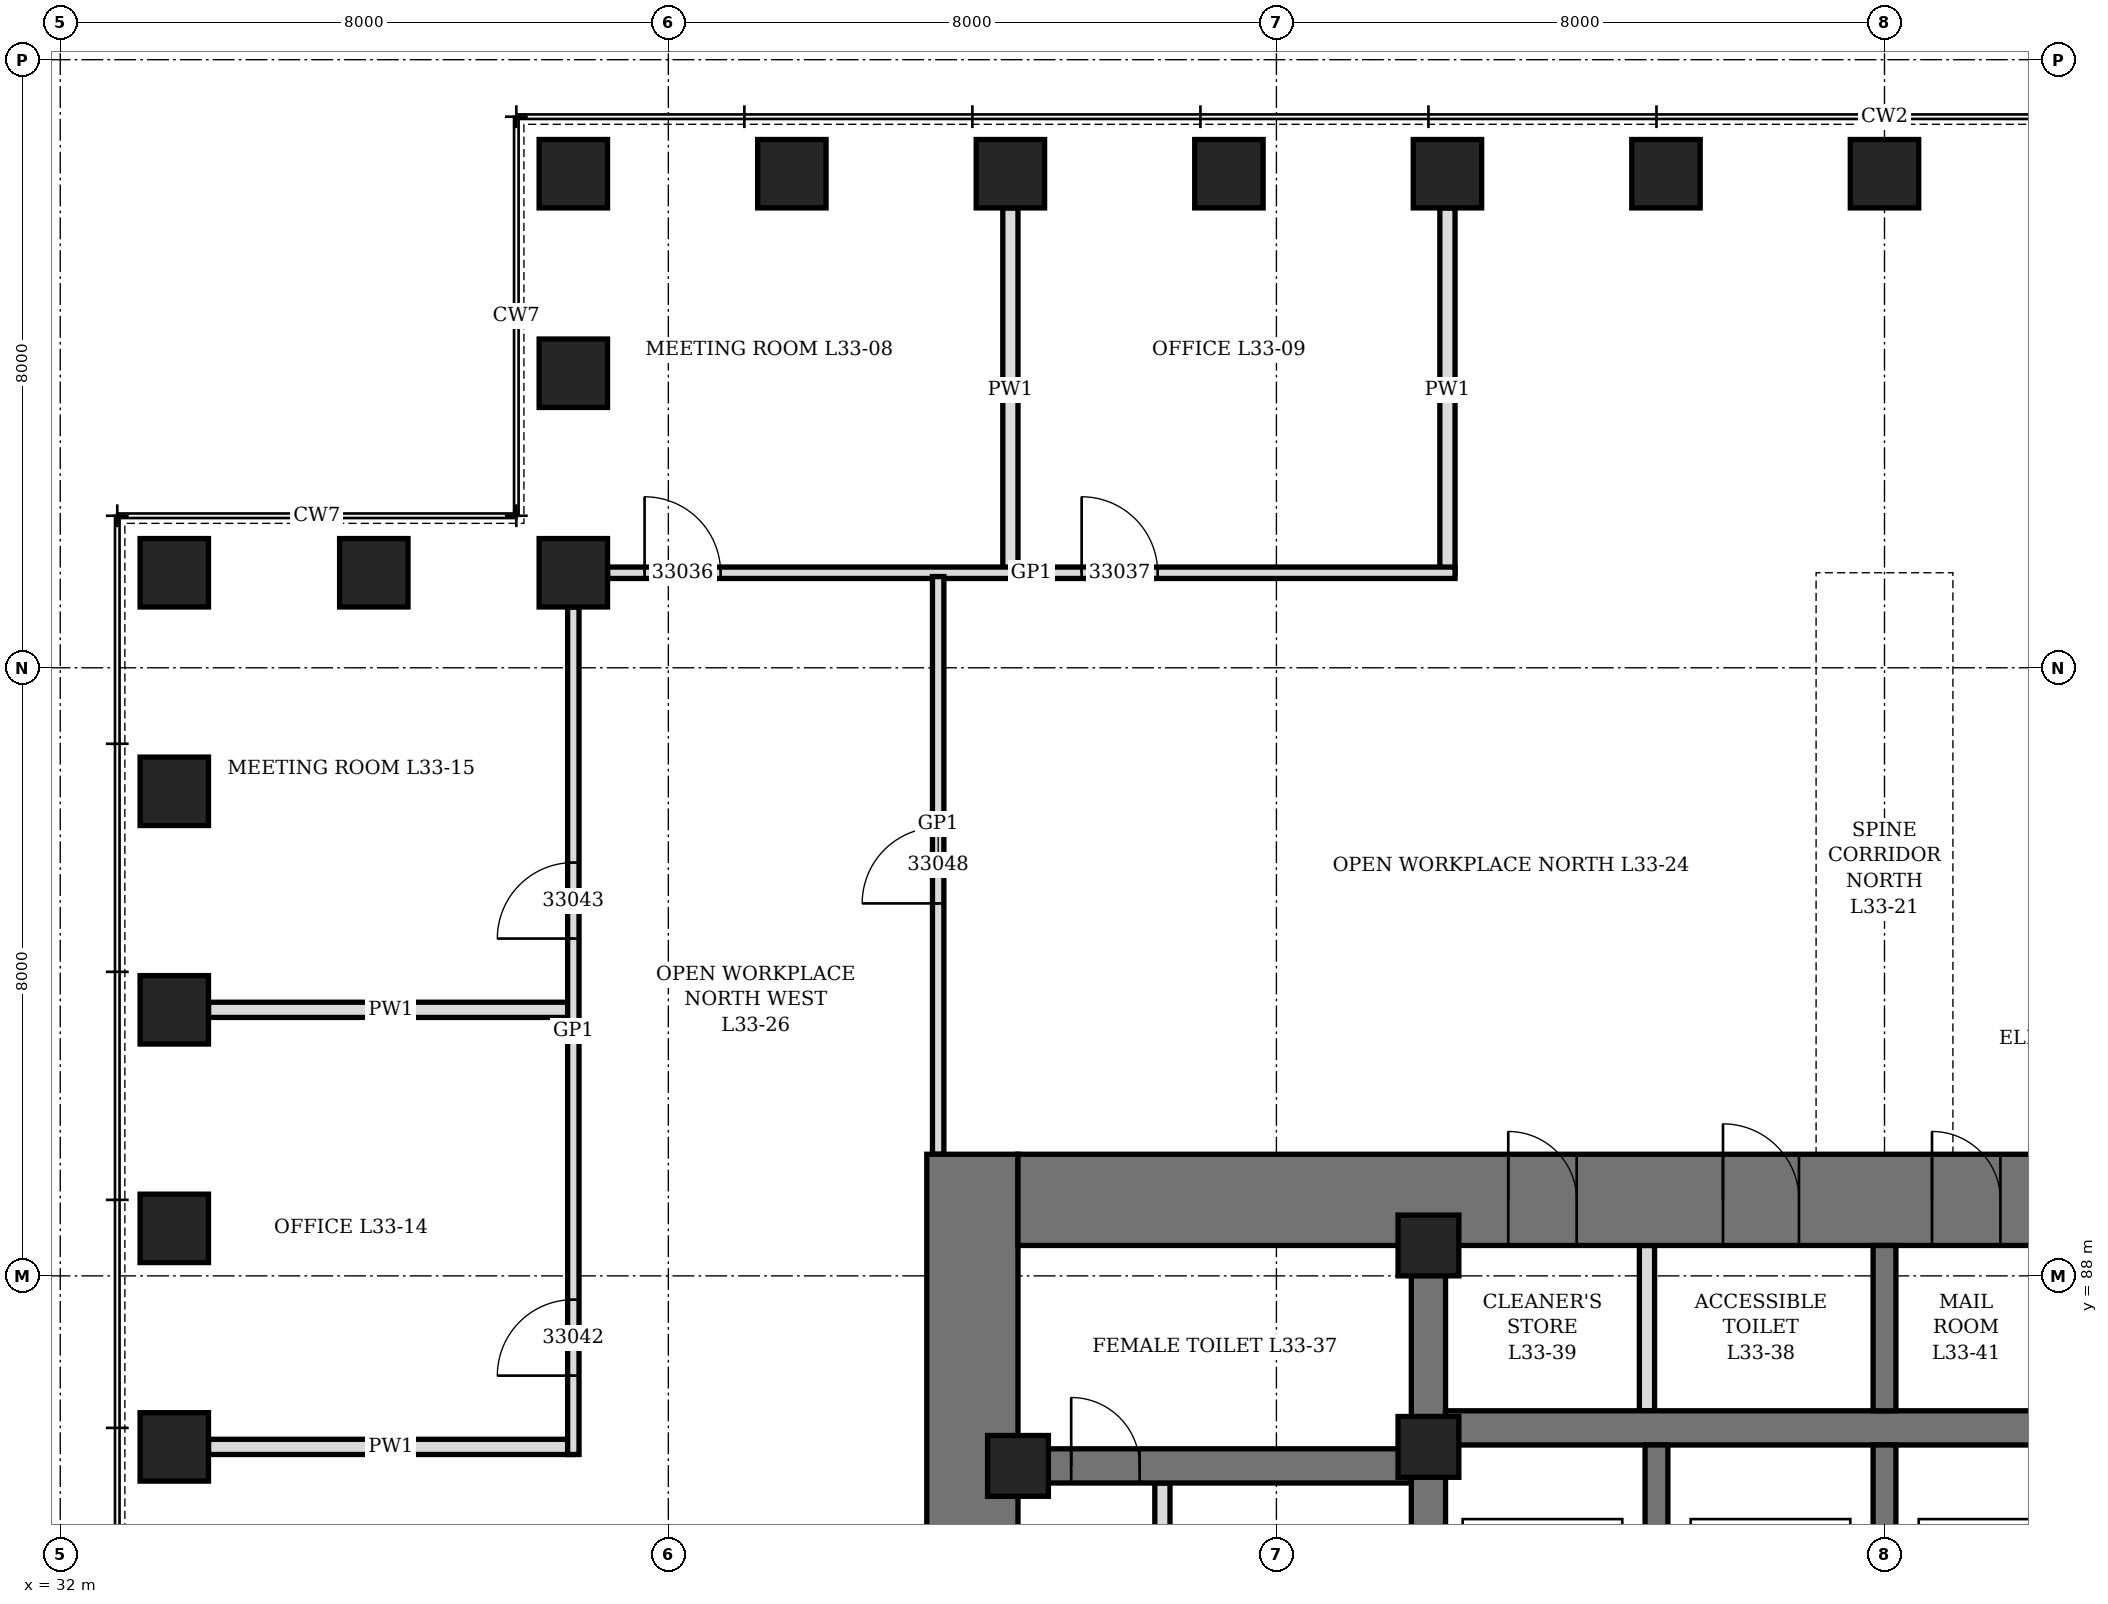
"""IFC4 building model, lengths in metres.
Left out: names, types, materials, properties, quantities, classifications, styles, units other than length and angle.
Written with IfcOpenShell. Run it as: python <this file> out.ifc"""

import sys

from ifc_helpers import new_model, si_unit, direction, frame, frame_2d, origin, origin_2d, place, context, subcontext, project, spatial, rectangle, hollow_rectangle, extrude, element, fill, save


model = new_model("IFC4")
c1 = context("Model", 3, precision=1e-05, world=origin(), true_north=direction((0.0, 1.0)))
c2 = subcontext(c1, "Body", "Model", "MODEL_VIEW")
j1 = project(units=[si_unit("LENGTHUNIT", "METRE"), si_unit("PLANEANGLEUNIT", "RADIAN")], contexts=[c1])
p1 = place(None, origin())
s1 = spatial("IfcSite", under=j1, at=p1, CompositionType="ELEMENT")
p2 = place(p1, origin())
s2 = spatial("IfcBuilding", under=s1, at=p2, CompositionType="ELEMENT")
p3 = place(p2, frame((0.0, 0.0, 150.1)))
s3 = spatial("IfcBuildingStorey", under=s2, at=p3, CompositionType="ELEMENT", Elevation=150.1)
for number, where, z_axis, x_axis in (
    (1, (56.0, 102.5, 0.0), (0.0, 0.0, 1.0), (1.0, 0.0, 0.0)),
    (2, (53.125, 102.5, 0.0), (0.0, 0.0, 1.0), (1.0, 0.0, 0.0)),
    (3, (50.25, 102.5, 0.0), (0.0, 0.0, 1.0), (1.0, 0.0, 0.0)),
    (4, (47.375, 102.5, 0.0), (0.0, 0.0, 1.0), (1.0, 0.0, 0.0)),
    (5, (44.5, 102.5, 0.0), (0.0, 0.0, 1.0), (1.0, 0.0, 0.0)),
    (6, (41.625, 102.5, 0.0), (0.0, 0.0, 1.0), (1.0, 0.0, 0.0)),
    (7, (38.75, 102.5, 0.0), (0.0, 0.0, 1.0), (0.0, 1.0, 0.0)),
    (8, (38.75, 99.875, 0.0), (0.0, 0.0, 1.0), (0.0, 1.0, 0.0)),
    (9, (38.75, 97.25, 0.0), (0.0, 0.0, 1.0), (1.0, 0.0, 0.0)),
    (10, (36.125, 97.25, 0.0), (0.0, 0.0, 1.0), (1.0, 0.0, 0.0)),
    (11, (33.5, 97.25, 0.0), (0.0, 0.0, 1.0), (0.0, 1.0, 0.0)),
    (12, (33.5, 94.375, 0.0), (0.0, 0.0, 1.0), (0.0, 1.0, 0.0)),
    (13, (33.5, 91.5, 0.0), (0.0, 0.0, 1.0), (0.0, 1.0, 0.0)),
    (14, (33.5, 88.625, 0.0), (0.0, 0.0, 1.0), (0.0, 1.0, 0.0)),
    (15, (33.5, 85.75, 0.0), (0.0, 0.0, 1.0), (0.0, 1.0, 0.0)),
):
    element("IfcColumn", number, at=place(p3, frame(where, z_axis=z_axis, x_axis=x_axis)), inside=s3, PredefinedType="COLUMN", context=c2, shape_type="SweptSolid", body=[
        extrude(hollow_rectangle(XDim=0.9, YDim=0.9, WallThickness=0.12, at=origin_2d()), origin(), (0.0, 0.0, 1.0), 4.2),
    ])
p4 = place(p3, frame((44.0, 70.4, 0.0), z_axis=(0.0, 0.0, 1.0), x_axis=(0.0, 1.0, 0.0)))
e16 = element("IfcWall", 16, at=p4, inside=s3, PredefinedType="SHEAR", context=c2, shape_type="SweptSolid", body=[
    extrude(rectangle(XDim=19.2, YDim=1.2, at=frame_2d((9.6, 0.0))), origin(), (0.0, 0.0, 1.0), 4.2),
])
p5 = place(p4, frame((8.6, 0.0, 0.0)))
e17 = element("IfcOpeningElement", 17, at=p5, cuts=e16, PredefinedType="OPENING", context=c2, shape_type="SweptSolid", body=[
    extrude(rectangle(XDim=2.0, YDim=2.4, at=frame_2d((1.0, 1.2))), frame((0.0, 0.61, 0.0), z_axis=(0.0, -1.0, 0.0), x_axis=(1.0, 0.0, 0.0)), (0.0, 0.0, 1.0), 1.22),
])
p6 = place(p3, frame((44.6, 89.0, 0.0), z_axis=(0.0, 0.0, 1.0), x_axis=(1.0, 0.0, 0.0)))
e18 = element("IfcWall", 18, at=p6, inside=s3, PredefinedType="SHEAR", context=c2, shape_type="SweptSolid", body=[
    extrude(rectangle(XDim=22.8, YDim=1.2, at=frame_2d((11.4, 0.0))), origin(), (0.0, 0.0, 1.0), 4.2),
])
p7 = place(p6, frame((9.275, 0.0, 0.0)))
e19 = element("IfcOpeningElement", 19, at=p7, cuts=e18, PredefinedType="OPENING", context=c2, shape_type="SweptSolid", body=[
    extrude(rectangle(XDim=1.0, YDim=2.1, at=frame_2d((0.5, 1.05))), frame((0.0, 0.61, 0.0), z_axis=(0.0, -1.0, 0.0), x_axis=(1.0, 0.0, 0.0)), (0.0, 0.0, 1.0), 1.22),
])
p8 = place(p6, frame((6.45, 0.0, 0.0)))
e20 = element("IfcOpeningElement", 20, at=p8, cuts=e18, PredefinedType="OPENING", context=c2, shape_type="SweptSolid", body=[
    extrude(rectangle(XDim=0.9, YDim=2.1, at=frame_2d((0.45, 1.05))), frame((0.0, 0.61, 0.0), z_axis=(0.0, -1.0, 0.0), x_axis=(1.0, 0.0, 0.0)), (0.0, 0.0, 1.0), 1.22),
])
p9 = place(p6, frame((12.025, 0.0, 0.0)))
e21 = element("IfcOpeningElement", 21, at=p9, cuts=e18, PredefinedType="OPENING", context=c2, shape_type="SweptSolid", body=[
    extrude(rectangle(XDim=0.9, YDim=2.1, at=frame_2d((0.45, 1.05))), frame((0.0, 0.61, 0.0), z_axis=(0.0, -1.0, 0.0), x_axis=(1.0, 0.0, 0.0)), (0.0, 0.0, 1.0), 1.22),
])
p10 = place(p6, frame((13.962, 0.0, 0.0)))
e22 = element("IfcOpeningElement", 22, at=p10, cuts=e18, PredefinedType="OPENING", context=c2, shape_type="SweptSolid", body=[
    extrude(rectangle(XDim=0.9, YDim=2.1, at=frame_2d((0.45, 1.05))), frame((0.0, 0.61, 0.0), z_axis=(0.0, -1.0, 0.0), x_axis=(1.0, 0.0, 0.0)), (0.0, 0.0, 1.0), 1.22),
])
p11 = place(p3, frame((50.0, 71.6, 0.0), z_axis=(0.0, 0.0, 1.0), x_axis=(0.0, 1.0, 0.0)))
e23 = element("IfcWall", 23, at=p11, inside=s3, PredefinedType="SHEAR", context=c2, shape_type="SweptSolid", body=[
    extrude(rectangle(XDim=16.8, YDim=0.45, at=frame_2d((8.4, 0.0))), origin(), (0.0, 0.0, 1.0), 4.2),
])
p12 = place(p11, frame((7.5, 0.0, 0.0)))
e24 = element("IfcOpeningElement", 24, at=p12, cuts=e23, PredefinedType="OPENING", context=c2, shape_type="SweptSolid", body=[
    extrude(rectangle(XDim=1.8, YDim=2.4, at=frame_2d((0.9, 1.2))), frame((0.0, 0.235, 0.0), z_axis=(0.0, -1.0, 0.0), x_axis=(1.0, 0.0, 0.0)), (0.0, 0.0, 1.0), 0.47),
])
p13 = place(p3, frame((44.6, 85.5, 0.0), z_axis=(0.0, 0.0, 1.0), x_axis=(1.0, 0.0, 0.0)))
e25 = element("IfcWall", 25, at=p13, inside=s3, PredefinedType="SHEAR", context=c2, shape_type="SweptSolid", body=[
    extrude(rectangle(XDim=5.175, YDim=0.45, at=frame_2d((2.587, 0.0))), origin(), (0.0, 0.0, 1.0), 4.2),
])
p14 = place(p13, frame((0.7, 0.0, 0.0)))
e26 = element("IfcOpeningElement", 26, at=p14, cuts=e25, PredefinedType="OPENING", context=c2, shape_type="SweptSolid", body=[
    extrude(rectangle(XDim=0.9, YDim=2.1, at=frame_2d((0.45, 1.05))), frame((0.0, 0.235, 0.0), z_axis=(0.0, -1.0, 0.0), x_axis=(1.0, 0.0, 0.0)), (0.0, 0.0, 1.0), 0.47),
])
p15 = place(p3, frame((50.225, 86.0, 0.0), z_axis=(0.0, 0.0, 1.0), x_axis=(1.0, 0.0, 0.0)))
e27 = element("IfcWall", 27, at=p15, inside=s3, PredefinedType="SHEAR", context=c2, shape_type="SweptSolid", body=[
    extrude(rectangle(XDim=11.55, YDim=0.45, at=frame_2d((5.775, 0.0))), origin(), (0.0, 0.0, 1.0), 4.2),
])
for number, where, z_axis, x_axis in (
    (28, (53.0, 82.225, 0.0), (0.0, 0.0, 1.0), (0.0, 1.0, 0.0)),
    (29, (56.0, 82.225, 0.0), (0.0, 0.0, 1.0), (0.0, 1.0, 0.0)),
):
    element("IfcWall", number, at=place(p3, frame(where, z_axis=z_axis, x_axis=x_axis)), inside=s3, PredefinedType="SHEAR", context=c2, shape_type="SweptSolid", body=[
        extrude(rectangle(XDim=3.55, YDim=0.3, at=frame_2d((1.775, 0.0))), origin(), (0.0, 0.0, 1.0), 4.2),
    ])
p16 = place(p3, frame((56.0, 86.225, 0.0), z_axis=(0.0, 0.0, 1.0), x_axis=(0.0, 1.0, 0.0)))
e30 = element("IfcWall", 30, at=p16, inside=s3, PredefinedType="SHEAR", context=c2, shape_type="SweptSolid", body=[
    extrude(rectangle(XDim=2.175, YDim=0.3, at=frame_2d((1.087, 0.0))), origin(), (0.0, 0.0, 1.0), 4.2),
])
for number, where, z_axis, x_axis in (
    (31, (44.6, 85.5, 0.0), (0.0, 0.0, 1.0), (1.0, 0.0, 0.0)),
    (32, (50.0, 85.75, 0.0), (0.0, 0.0, 1.0), (1.0, 0.0, 0.0)),
    (33, (50.0, 88.4, 0.0), (0.0, 0.0, 1.0), (1.0, 0.0, 0.0)),
):
    element("IfcColumn", number, at=place(p3, frame(where, z_axis=z_axis, x_axis=x_axis)), inside=s3, PredefinedType="COLUMN", context=c2, shape_type="SweptSolid", body=[
        extrude(hollow_rectangle(XDim=0.8, YDim=0.8, WallThickness=0.1, at=origin_2d()), origin(), (0.0, 0.0, 1.0), 4.2),
    ])
p17 = place(p3, frame((46.5, 82.225, 0.0), z_axis=(0.0, 0.0, 1.0), x_axis=(0.0, 1.0, 0.0)))
e34 = element("IfcWall", 34, at=p17, inside=s3, PredefinedType="PARTITIONING", context=c2, shape_type="SweptSolid", body=[
    extrude(rectangle(XDim=3.05, YDim=0.2, at=frame_2d((1.525, 0.0))), origin(), (0.0, 0.0, 1.0), 4.04),
])
p18 = place(p17, frame((1.075, 0.0, 0.0)))
e35 = element("IfcOpeningElement", 35, at=p18, cuts=e34, PredefinedType="OPENING", context=c2, shape_type="SweptSolid", body=[
    extrude(rectangle(XDim=0.9, YDim=2.1, at=frame_2d((0.45, 1.05))), frame((0.0, 0.11, 0.0), z_axis=(0.0, -1.0, 0.0), x_axis=(1.0, 0.0, 0.0)), (0.0, 0.0, 1.0), 0.22),
])
p19 = place(p3, frame((52.875, 86.225, 0.0), z_axis=(0.0, 0.0, 1.0), x_axis=(0.0, 1.0, 0.0)))
e36 = element("IfcWall", 36, at=p19, inside=s3, PredefinedType="PARTITIONING", context=c2, shape_type="SweptSolid", body=[
    extrude(rectangle(XDim=2.175, YDim=0.2, at=frame_2d((1.087, 0.0))), origin(), (0.0, 0.0, 1.0), 3.14),
])
p20 = place(p3, frame((44.5, 97.25, 0.0), z_axis=(0.0, 0.0, 1.0), x_axis=(0.0, 1.0, 0.0)))
e37 = element("IfcWall", 37, at=p20, inside=s3, PredefinedType="PARTITIONING", context=c2, shape_type="SweptSolid", body=[
    extrude(rectangle(XDim=4.8, YDim=0.2, at=frame_2d((2.4, 0.0))), origin(), (0.0, 0.0, 1.0), 2.74),
])
p21 = place(p3, frame((50.25, 97.25, 0.0), z_axis=(0.0, 0.0, 1.0), x_axis=(0.0, 1.0, 0.0)))
e38 = element("IfcWall", 38, at=p21, inside=s3, PredefinedType="PARTITIONING", context=c2, shape_type="SweptSolid", body=[
    extrude(rectangle(XDim=4.8, YDim=0.2, at=frame_2d((2.4, 0.0))), origin(), (0.0, 0.0, 1.0), 3.278),
])
for number, where, z_axis, x_axis in (
    (39, (33.95, 85.75, 0.0), (0.0, 0.0, 1.0), (1.0, 0.0, 0.0)),
    (40, (33.95, 91.5, 0.0), (0.0, 0.0, 1.0), (1.0, 0.0, 0.0)),
):
    element("IfcWall", number, at=place(p3, frame(where, z_axis=z_axis, x_axis=x_axis)), inside=s3, PredefinedType="PARTITIONING", context=c2, shape_type="SweptSolid", body=[
        extrude(rectangle(XDim=4.8, YDim=0.2, at=frame_2d((2.4, 0.0))), origin(), (0.0, 0.0, 1.0), 3.428),
    ])
p22 = place(p3, frame((39.2, 97.25, 0.0), z_axis=(0.0, 0.0, 1.0), x_axis=(1.0, 0.0, 0.0)))
e41 = element("IfcWall", 41, at=p22, inside=s3, PredefinedType="PARTITIONING", context=c2, shape_type="SweptSolid", body=[
    extrude(rectangle(XDim=11.15, YDim=0.15, at=frame_2d((5.575, 0.0))), origin(), (0.0, 0.0, 1.0), 4.04),
])
p23 = place(p22, frame((0.488, 0.0, 0.0)))
e42 = element("IfcOpeningElement", 42, at=p23, cuts=e41, PredefinedType="OPENING", context=c2, shape_type="SweptSolid", body=[
    extrude(rectangle(XDim=1.0, YDim=2.4, at=frame_2d((0.5, 1.2))), frame((0.0, 0.085, 0.0), z_axis=(0.0, -1.0, 0.0), x_axis=(1.0, 0.0, 0.0)), (0.0, 0.0, 1.0), 0.17),
])
p24 = place(p22, frame((6.238, 0.0, 0.0)))
e43 = element("IfcOpeningElement", 43, at=p24, cuts=e41, PredefinedType="OPENING", context=c2, shape_type="SweptSolid", body=[
    extrude(rectangle(XDim=1.0, YDim=2.1, at=frame_2d((0.5, 1.05))), frame((0.0, 0.085, 0.0), z_axis=(0.0, -1.0, 0.0), x_axis=(1.0, 0.0, 0.0)), (0.0, 0.0, 1.0), 0.17),
])
p25 = place(p3, frame((38.75, 85.65, 0.0), z_axis=(0.0, 0.0, 1.0), x_axis=(0.0, 1.0, 0.0)))
e44 = element("IfcWall", 44, at=p25, inside=s3, PredefinedType="PARTITIONING", context=c2, shape_type="SweptSolid", body=[
    extrude(rectangle(XDim=11.15, YDim=0.15, at=frame_2d((5.575, 0.0))), origin(), (0.0, 0.0, 1.0), 4.04),
])
p26 = place(p25, frame((1.038, 0.0, 0.0)))
e45 = element("IfcOpeningElement", 45, at=p26, cuts=e44, PredefinedType="OPENING", context=c2, shape_type="SweptSolid", body=[
    extrude(rectangle(XDim=1.0, YDim=2.1, at=frame_2d((0.5, 1.05))), frame((0.0, 0.085, 0.0), z_axis=(0.0, -1.0, 0.0), x_axis=(1.0, 0.0, 0.0)), (0.0, 0.0, 1.0), 0.17),
])
p27 = place(p25, frame((6.788, 0.0, 0.0)))
e46 = element("IfcOpeningElement", 46, at=p27, cuts=e44, PredefinedType="OPENING", context=c2, shape_type="SweptSolid", body=[
    extrude(rectangle(XDim=1.0, YDim=2.4, at=frame_2d((0.5, 1.2))), frame((0.0, 0.085, 0.0), z_axis=(0.0, -1.0, 0.0), x_axis=(1.0, 0.0, 0.0)), (0.0, 0.0, 1.0), 0.17),
])
p28 = place(p3, frame((43.55, 89.6, 0.0), z_axis=(0.0, 0.0, 1.0), x_axis=(0.0, 1.0, 0.0)))
e47 = element("IfcWall", 47, at=p28, inside=s3, PredefinedType="PARTITIONING", context=c2, shape_type="SweptSolid", body=[
    extrude(rectangle(XDim=7.6, YDim=0.15, at=frame_2d((3.8, 0.0))), origin(), (0.0, 0.0, 1.0), 4.04),
])
p29 = place(p28, frame((3.3, 0.0, 0.0)))
e48 = element("IfcOpeningElement", 48, at=p29, cuts=e47, PredefinedType="OPENING", context=c2, shape_type="SweptSolid", body=[
    extrude(rectangle(XDim=1.0, YDim=2.4, at=frame_2d((0.5, 1.2))), frame((0.0, 0.085, 0.0), z_axis=(0.0, -1.0, 0.0), x_axis=(1.0, 0.0, 0.0)), (0.0, 0.0, 1.0), 0.17),
])
p30 = place(p14, origin())
e49 = element("IfcDoor", 49, at=p30, inside=s3, OperationType="SINGLE_SWING_RIGHT", PredefinedType="DOOR", context=c2, shape_type="SweptSolid", body=[
    extrude(rectangle(XDim=0.9, YDim=2.1, at=frame_2d((0.45, 1.05))), frame((0.0, 0.225, 0.0), z_axis=(0.0, -1.0, 0.0), x_axis=(1.0, 0.0, 0.0)), (0.0, 0.0, 1.0), 0.449),
])
fill(e26, e49)
p31 = place(p7, origin())
e50 = element("IfcDoor", 50, at=p31, inside=s3, OperationType="SINGLE_SWING_LEFT", PredefinedType="DOOR", context=c2, shape_type="SweptSolid", body=[
    extrude(rectangle(XDim=1.0, YDim=2.1, at=frame_2d((0.5, 1.05))), frame((0.0, 0.35, 0.0), z_axis=(0.0, -1.0, 0.0), x_axis=(1.0, 0.0, 0.0)), (0.0, 0.0, 1.0), 0.7),
])
fill(e19, e50)
p32 = place(p8, origin())
e51 = element("IfcDoor", 51, at=p32, inside=s3, OperationType="SINGLE_SWING_LEFT", PredefinedType="DOOR", context=c2, shape_type="SweptSolid", body=[
    extrude(rectangle(XDim=0.9, YDim=2.1, at=frame_2d((0.45, 1.05))), frame((0.0, 0.35, 0.0), z_axis=(0.0, -1.0, 0.0), x_axis=(1.0, 0.0, 0.0)), (0.0, 0.0, 1.0), 0.7),
])
fill(e20, e51)
p33 = place(p9, origin())
e52 = element("IfcDoor", 52, at=p33, inside=s3, OperationType="SINGLE_SWING_LEFT", PredefinedType="DOOR", context=c2, shape_type="SweptSolid", body=[
    extrude(rectangle(XDim=0.9, YDim=2.1, at=frame_2d((0.45, 1.05))), frame((0.0, 0.35, 0.0), z_axis=(0.0, -1.0, 0.0), x_axis=(1.0, 0.0, 0.0)), (0.0, 0.0, 1.0), 0.7),
])
fill(e21, e52)
p34 = place(p23, origin())
e53 = element("IfcDoor", 53, at=p34, inside=s3, OperationType="SINGLE_SWING_RIGHT", PredefinedType="DOOR", context=c2, shape_type="SweptSolid", body=[
    extrude(rectangle(XDim=1.0, YDim=2.4, at=frame_2d((0.5, 1.2))), frame((0.0, 0.075, 0.0), z_axis=(0.0, -1.0, 0.0), x_axis=(1.0, 0.0, 0.0)), (0.0, 0.0, 1.0), 0.149),
])
fill(e42, e53)
p35 = place(p24, origin())
e54 = element("IfcDoor", 54, at=p35, inside=s3, OperationType="SINGLE_SWING_LEFT", PredefinedType="DOOR", context=c2, shape_type="SweptSolid", body=[
    extrude(rectangle(XDim=1.0, YDim=2.1, at=frame_2d((0.5, 1.05))), frame((0.0, 0.075, 0.0), z_axis=(0.0, -1.0, 0.0), x_axis=(1.0, 0.0, 0.0)), (0.0, 0.0, 1.0), 0.149),
])
fill(e43, e54)
p36 = place(p26, origin())
e55 = element("IfcDoor", 55, at=p36, inside=s3, OperationType="SINGLE_SWING_LEFT", PredefinedType="DOOR", context=c2, shape_type="SweptSolid", body=[
    extrude(rectangle(XDim=1.0, YDim=2.1, at=frame_2d((0.5, 1.05))), frame((0.0, 0.075, 0.0), z_axis=(0.0, -1.0, 0.0), x_axis=(1.0, 0.0, 0.0)), (0.0, 0.0, 1.0), 0.149),
])
fill(e45, e55)
p37 = place(p27, origin())
e56 = element("IfcDoor", 56, at=p37, inside=s3, OperationType="SINGLE_SWING_RIGHT", PredefinedType="DOOR", context=c2, shape_type="SweptSolid", body=[
    extrude(rectangle(XDim=1.0, YDim=2.4, at=frame_2d((0.5, 1.2))), frame((0.0, 0.075, 0.0), z_axis=(0.0, -1.0, 0.0), x_axis=(1.0, 0.0, 0.0)), (0.0, 0.0, 1.0), 0.149),
])
fill(e46, e56)
p38 = place(p29, origin())
e57 = element("IfcDoor", 57, at=p38, inside=s3, OperationType="SINGLE_SWING_RIGHT", PredefinedType="DOOR", context=c2, shape_type="SweptSolid", body=[
    extrude(rectangle(XDim=1.0, YDim=2.4, at=frame_2d((0.5, 1.2))), frame((0.0, 0.075, 0.0), z_axis=(0.0, -1.0, 0.0), x_axis=(1.0, 0.0, 0.0)), (0.0, 0.0, 1.0), 0.149),
])
fill(e48, e57)
save(model, sys.argv[1])
